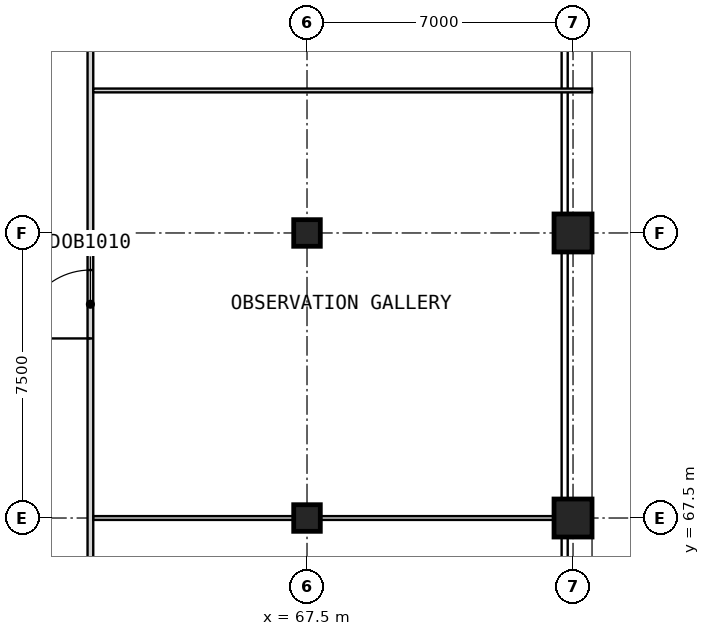
"""IFC4 building model, lengths in metres.
Left out: names, types, materials, properties, quantities, classifications, styles, units other than length and angle.
Written with IfcOpenShell. Run it as: python <this file> out.ifc"""

import sys

from ifc_helpers import new_model, si_unit, direction, frame, frame_2d, origin, origin_2d, place, context, subcontext, project, spatial, rectangle, extrude, element, fill, save


model = new_model("IFC4")
c1 = context("Model", 3, precision=1e-05, world=origin(), true_north=direction((0.0, 1.0)))
c2 = subcontext(c1, "Body", "Model", "MODEL_VIEW")
j1 = project(units=[si_unit("LENGTHUNIT", "METRE"), si_unit("PLANEANGLEUNIT", "RADIAN")], contexts=[c1])
p1 = place(None, origin())
s1 = spatial("IfcSite", under=j1, at=p1, CompositionType="ELEMENT")
p2 = place(p1, origin())
s2 = spatial("IfcBuilding", under=s1, at=p2, CompositionType="ELEMENT")
p3 = place(p2, frame((0.0, 0.0, 302.7)))
s3 = spatial("IfcBuildingStorey", under=s2, at=p3, CompositionType="ELEMENT", Elevation=302.7)
for number, where, z_axis, x_axis in (
    (1, (67.5, 67.5, 0.0), (0.0, 0.0, 1.0), (1.0, 0.0, 0.0)),
    (2, (67.5, 75.0, 0.0), (0.0, 0.0, 1.0), (1.0, 0.0, 0.0)),
):
    element("IfcColumn", number, at=place(p3, frame(where, z_axis=z_axis, x_axis=x_axis)), inside=s3, PredefinedType="COLUMN", context=c2, shape_type="SweptSolid", body=[
        extrude(rectangle(XDim=0.7, YDim=0.7, at=origin_2d()), origin(), (0.0, 0.0, 1.0), 6.0),
    ])
for number, where, z_axis, x_axis in (
    (3, (74.5, 67.5, 0.0), (0.0, 0.0, 1.0), (1.0, 0.0, 0.0)),
    (4, (74.5, 75.0, 0.0), (0.0, 0.0, 1.0), (1.0, 0.0, 0.0)),
):
    element("IfcColumn", number, at=place(p3, frame(where, z_axis=z_axis, x_axis=x_axis)), inside=s3, PredefinedType="COLUMN", context=c2, shape_type="SweptSolid", body=[
        extrude(rectangle(XDim=1.0, YDim=1.0, at=origin_2d()), origin(), (0.0, 0.0, 1.0), 6.0),
    ])
p4 = place(p3, frame((61.8, 58.275, 0.0), z_axis=(0.0, 0.0, 1.0), x_axis=(0.0, 1.0, 0.0)))
e5 = element("IfcWall", 5, at=p4, inside=s3, PredefinedType="PARTITIONING", context=c2, shape_type="SweptSolid", body=[
    extrude(rectangle(XDim=25.95, YDim=0.15, at=frame_2d((12.975, 0.0))), origin(), (0.0, 0.0, 1.0), 5.7),
])
p5 = place(p4, frame((4.975, 0.0, 0.0)))
e6 = element("IfcOpeningElement", 6, at=p5, cuts=e5, PredefinedType="OPENING", context=c2, shape_type="SweptSolid", body=[
    extrude(rectangle(XDim=1.0, YDim=2.1, at=frame_2d((0.5, 1.05))), frame((0.0, 0.085, 0.0), z_axis=(0.0, -1.0, 0.0), x_axis=(1.0, 0.0, 0.0)), (0.0, 0.0, 1.0), 0.17),
])
p6 = place(p4, frame((13.95, 0.0, 0.0)))
e7 = element("IfcOpeningElement", 7, at=p6, cuts=e5, PredefinedType="OPENING", context=c2, shape_type="SweptSolid", body=[
    extrude(rectangle(XDim=1.8, YDim=2.1, at=frame_2d((0.9, 1.05))), frame((0.0, 0.085, 0.0), z_axis=(0.0, -1.0, 0.0), x_axis=(1.0, 0.0, 0.0)), (0.0, 0.0, 1.0), 0.17),
])
p7 = place(p4, frame((21.85, 0.0, 0.0)))
e8 = element("IfcOpeningElement", 8, at=p7, cuts=e5, PredefinedType="OPENING", context=c2, shape_type="SweptSolid", body=[
    extrude(rectangle(XDim=1.0, YDim=2.1, at=frame_2d((0.5, 1.05))), frame((0.0, 0.085, 0.0), z_axis=(0.0, -1.0, 0.0), x_axis=(1.0, 0.0, 0.0)), (0.0, 0.0, 1.0), 0.17),
])
for number, where, z_axis, x_axis in (
    (9, (61.875, 67.5, 0.0), (0.0, 0.0, 1.0), (1.0, 0.0, 0.0)),
    (10, (61.875, 78.75, 0.0), (0.0, 0.0, 1.0), (1.0, 0.0, 0.0)),
):
    element("IfcWall", number, at=place(p3, frame(where, z_axis=z_axis, x_axis=x_axis)), inside=s3, PredefinedType="PARTITIONING", context=c2, shape_type="SweptSolid", body=[
        extrude(rectangle(XDim=13.125, YDim=0.1, at=frame_2d((6.562, 0.0))), origin(), (0.0, 0.0, 1.0), 5.7),
    ])
p8 = place(p6, origin())
e11 = element("IfcDoor", 11, at=p8, inside=s3, OperationType="DOUBLE_DOOR_SINGLE_SWING", PredefinedType="DOOR", context=c2, shape_type="SweptSolid", body=[
    extrude(rectangle(XDim=1.8, YDim=2.1, at=frame_2d((0.9, 1.05))), frame((0.0, 0.025, 0.0), z_axis=(0.0, -1.0, 0.0), x_axis=(1.0, 0.0, 0.0)), (0.0, 0.0, 1.0), 0.05),
])
fill(e7, e11)
save(model, sys.argv[1])
